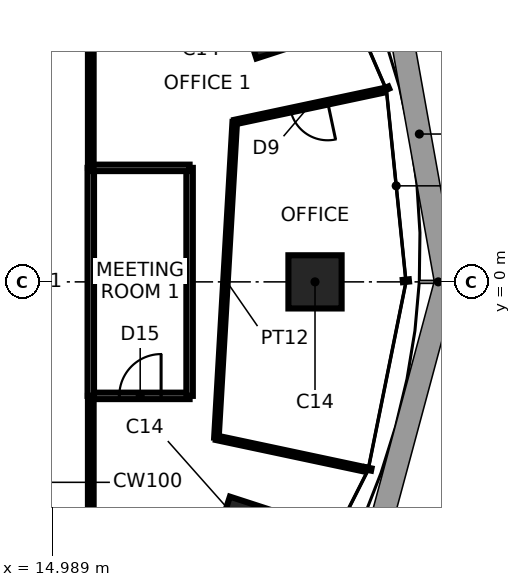
"""IFC4 building model, lengths in metres.
Left out: names, types, materials, properties, quantities, classifications, styles, units other than length and angle.
Written with IfcOpenShell. Run it as: python <this file> out.ifc"""

import sys

from ifc_helpers import new_model, si_unit, direction, frame, frame_2d, origin, origin_2d, place, context, subcontext, project, spatial, rectangle, extrude, element, fill, save


model = new_model("IFC4")
c1 = context("Model", 3, precision=1e-05, world=origin(), true_north=direction((0.0, 1.0)))
c2 = subcontext(c1, "Body", "Model", "MODEL_VIEW")
j1 = project(units=[si_unit("LENGTHUNIT", "METRE"), si_unit("PLANEANGLEUNIT", "RADIAN")], contexts=[c1])
p1 = place(None, origin())
s1 = spatial("IfcSite", under=j1, at=p1, CompositionType="ELEMENT")
p2 = place(p1, origin())
s2 = spatial("IfcBuilding", under=s1, at=p2, CompositionType="ELEMENT")
p3 = place(p2, frame((0.0, 0.0, 195.5)))
s3 = spatial("IfcBuildingStorey", under=s2, at=p3, CompositionType="ELEMENT", Elevation=195.5)
for number, where, z_axis, x_axis in (
    (1, (21.9, 0.0, 0.0), (0.0, 0.0, 1.0), (1.0, 0.0, 0.0)),
    (2, (20.808, 6.761, 0.0), (0.0, 0.0, 1.0), (0.951, 0.309, 0.0)),
    (3, (20.109, -6.534, 0.0), (0.0, 0.0, 1.0), (0.951, -0.309, 0.0)),
):
    element("IfcColumn", number, at=place(p3, frame(where, z_axis=z_axis, x_axis=x_axis)), inside=s3, PredefinedType="COLUMN", context=c2, shape_type="SweptSolid", body=[
        extrude(rectangle(XDim=1.4, YDim=1.4, at=origin_2d()), origin(), (0.0, 0.0, 1.0), 3.9),
    ])
p4 = place(p3, frame((16.0, -11.3, 0.0), z_axis=(0.0, 0.0, 1.0), x_axis=(0.0, 1.0, 0.0)))
e4 = element("IfcWall", 4, at=p4, inside=s3, PredefinedType="PARTITIONING", context=c2, shape_type="SweptSolid", body=[
    extrude(rectangle(XDim=8.3, YDim=0.15, at=frame_2d((4.15, 0.0))), origin(), (0.0, 0.0, 1.0), 3.74),
])
p5 = place(p3, frame((19.306, -4.104, 0.0), z_axis=(0.0, 0.0, 1.0), x_axis=(0.978137903693, -0.207957306576, 0.0)))
e5 = element("IfcWall", 5, at=p5, inside=s3, PredefinedType="PARTITIONING", context=c2, shape_type="SweptSolid", body=[
    extrude(rectangle(XDim=4.0, YDim=0.12, at=frame_2d((2.0, 0.0))), origin(), (0.0, 0.0, 1.0), 3.74),
])
p6 = place(p3, frame((16.0, -3.0, 0.0), z_axis=(0.0, 0.0, 1.0), x_axis=(1.0, 0.0, 0.0)))
e6 = element("IfcWall", 6, at=p6, inside=s3, PredefinedType="PARTITIONING", context=c2, shape_type="SweptSolid", body=[
    extrude(rectangle(XDim=2.6, YDim=0.17, at=frame_2d((1.3, 0.0))), origin(), (0.0, 0.0, 1.0), 3.74),
])
p7 = place(p6, frame((0.75, 0.0, 0.0)))
e7 = element("IfcOpeningElement", 7, at=p7, cuts=e6, PredefinedType="OPENING", context=c2, shape_type="SweptSolid", body=[
    extrude(rectangle(XDim=1.1, YDim=2.4, at=frame_2d((0.55, 1.2))), frame((0.0, 0.095, 0.0), z_axis=(0.0, -1.0, 0.0), x_axis=(1.0, 0.0, 0.0)), (0.0, 0.0, 1.0), 0.19),
])
for number, where, z_axis, x_axis in (
    (8, (16.0, 3.0, 0.0), (0.0, 0.0, 1.0), (0.0, -1.0, 0.0)),
    (9, (18.6, -3.0, 0.0), (0.0, 0.0, 1.0), (0.0, 1.0, 0.0)),
):
    element("IfcWall", number, at=place(p3, frame(where, z_axis=z_axis, x_axis=x_axis)), inside=s3, PredefinedType="PARTITIONING", context=c2, shape_type="SweptSolid", body=[
        extrude(rectangle(XDim=6.0, YDim=0.17, at=frame_2d((3.0, 0.0))), origin(), (0.0, 0.0, 1.0), 3.74),
    ])
p8 = place(p3, frame((19.788, 4.206, 0.0), z_axis=(0.0, 0.0, 1.0), x_axis=(-0.0579293499, -0.998320685161, 0.0)))
e10 = element("IfcWall", 10, at=p8, inside=s3, PredefinedType="PARTITIONING", context=c2, shape_type="SweptSolid", body=[
    extrude(rectangle(XDim=8.323, YDim=0.12, at=frame_2d((4.162, 0.0))), origin(), (0.0, 0.0, 1.0), 3.74),
])
p9 = place(p3, frame((18.6, 3.0, 0.0), z_axis=(0.0, 0.0, 1.0), x_axis=(-1.0, 0.0, 0.0)))
e11 = element("IfcWall", 11, at=p9, inside=s3, PredefinedType="PARTITIONING", context=c2, shape_type="SweptSolid", body=[
    extrude(rectangle(XDim=2.6, YDim=0.17, at=frame_2d((1.3, 0.0))), origin(), (0.0, 0.0, 1.0), 3.74),
])
p10 = place(p3, frame((23.7, 5.038, 0.0), z_axis=(0.0, 0.0, 1.0), x_axis=(-0.978152955943, -0.207886494942, 0.0)))
e12 = element("IfcWall", 12, at=p10, inside=s3, PredefinedType="PARTITIONING", context=c2, shape_type="SweptSolid", body=[
    extrude(rectangle(XDim=4.0, YDim=0.12, at=frame_2d((2.0, 0.0))), origin(), (0.0, 0.0, 1.0), 3.74),
])
p11 = place(p10, frame((1.5, 0.0, 0.0)))
e13 = element("IfcOpeningElement", 13, at=p11, cuts=e12, PredefinedType="OPENING", context=c2, shape_type="SweptSolid", body=[
    extrude(rectangle(XDim=1.0, YDim=2.4, at=frame_2d((0.5, 1.2))), frame((0.0, 0.07, 0.0), z_axis=(0.0, -1.0, 0.0), x_axis=(1.0, 0.0, 0.0)), (0.0, 0.0, 1.0), 0.14),
])
p12 = place(p3, frame((16.0, 3.0, 0.0), z_axis=(0.0, 0.0, 1.0), x_axis=(0.0, 1.0, 0.0)))
e14 = element("IfcWall", 14, at=p12, inside=s3, PredefinedType="PARTITIONING", context=c2, shape_type="SweptSolid", body=[
    extrude(rectangle(XDim=8.3, YDim=0.15, at=frame_2d((4.15, 0.0))), origin(), (0.0, 0.0, 1.0), 3.74),
])
p13 = place(p11, origin())
e15 = element("IfcDoor", 15, at=p13, inside=s3, OperationType="SINGLE_SWING_LEFT", PredefinedType="DOOR", context=c2, shape_type="SweptSolid", body=[
    extrude(rectangle(XDim=1.0, YDim=2.4, at=frame_2d((0.5, 1.2))), frame((0.0, 0.025, 0.0), z_axis=(0.0, -1.0, 0.0), x_axis=(1.0, 0.0, 0.0)), (0.0, 0.0, 1.0), 0.05),
])
fill(e13, e15)
p14 = place(p7, origin())
e16 = element("IfcDoor", 16, at=p14, inside=s3, OperationType="SINGLE_SWING_RIGHT", PredefinedType="DOOR", context=c2, shape_type="SweptSolid", body=[
    extrude(rectangle(XDim=1.1, YDim=2.4, at=frame_2d((0.55, 1.2))), frame((0.0, 0.025, 0.0), z_axis=(0.0, -1.0, 0.0), x_axis=(1.0, 0.0, 0.0)), (0.0, 0.0, 1.0), 0.05),
])
fill(e7, e16)
save(model, sys.argv[1])
